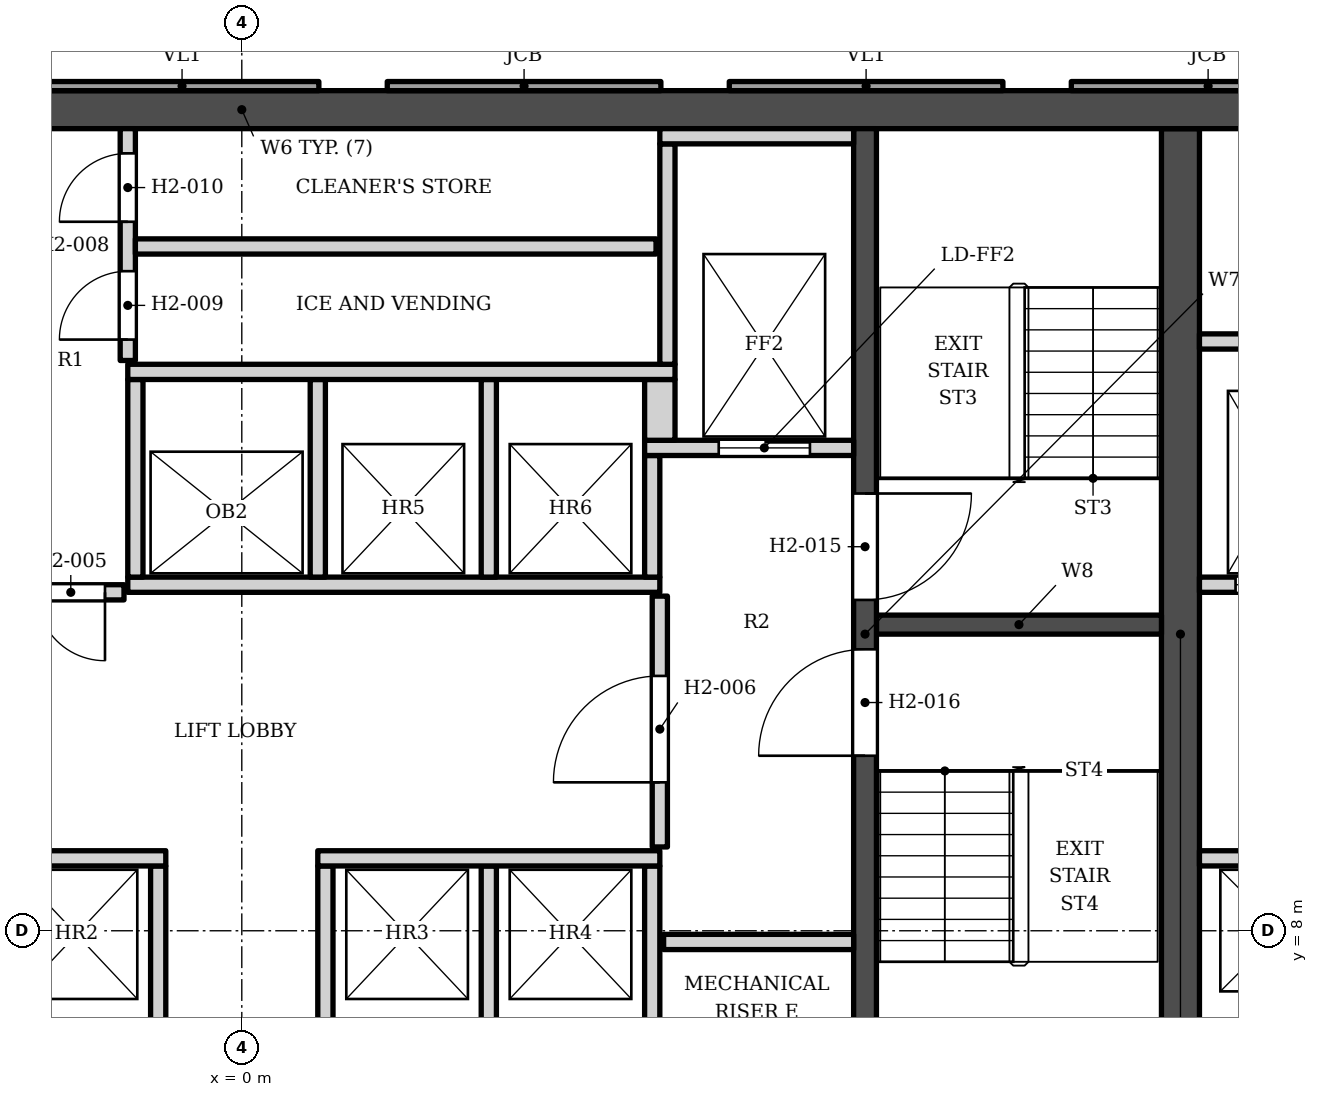
"""IFC4 building model, lengths in metres.
Left out: names, types, materials, properties, quantities, classifications, styles, units other than length and angle.
Written with IfcOpenShell. Run it as: python <this file> out.ifc"""

import sys

from ifc_helpers import new_model, si_unit, direction, frame, frame_2d, origin, place, context, subcontext, project, spatial, polyline, rectangle, outline, extrude, element, fill, save


model = new_model("IFC4")
c1 = context("Model", 3, precision=1e-05, world=origin(), true_north=direction((0.0, 1.0)))
c2 = subcontext(c1, "Body", "Model", "MODEL_VIEW")
j1 = project(units=[si_unit("LENGTHUNIT", "METRE"), si_unit("PLANEANGLEUNIT", "RADIAN")], contexts=[c1])
p1 = place(None, origin())
s1 = spatial("IfcSite", under=j1, at=p1, CompositionType="ELEMENT")
p2 = place(p1, origin())
s2 = spatial("IfcBuilding", under=s1, at=p2, CompositionType="ELEMENT")
p3 = place(p2, frame((0.0, 0.0, 56.2)))
s3 = spatial("IfcBuildingStorey", under=s2, at=p3, CompositionType="ELEMENT", Elevation=56.2)
p4 = place(p3, frame((-16.9, 18.802, 0.0), z_axis=(0.0, 0.0, 1.0), x_axis=(1.0, 0.0, 0.0)))
e1 = element("IfcWall", 1, at=p4, inside=s3, PredefinedType="SHEAR", context=c2, shape_type="SweptSolid", body=[
    extrude(rectangle(XDim=33.8, YDim=0.5, at=frame_2d((16.9, 0.0))), origin(), (0.0, 0.0, 1.0), 3.4),
])
p5 = place(p3, frame((12.35, 5.253, 0.0), z_axis=(0.0, 0.0, 1.0), x_axis=(0.0, 1.0, 0.0)))
e2 = element("IfcWall", 2, at=p5, inside=s3, PredefinedType="SHEAR", context=c2, shape_type="SweptSolid", body=[
    extrude(rectangle(XDim=13.3, YDim=0.5, at=frame_2d((6.65, 0.0))), origin(), (0.0, 0.0, 1.0), 3.4),
])
p6 = place(p3, frame((8.2, 5.253, 0.0), z_axis=(0.0, 0.0, 1.0), x_axis=(0.0, 1.0, 0.0)))
e3 = element("IfcWall", 3, at=p6, inside=s3, PredefinedType="SHEAR", context=c2, shape_type="SweptSolid", body=[
    extrude(rectangle(XDim=13.3, YDim=0.3, at=frame_2d((6.65, 0.0))), origin(), (0.0, 0.0, 1.0), 3.4),
])
p7 = place(p6, frame((7.1, 0.0, 0.0)))
e4 = element("IfcOpeningElement", 4, at=p7, cuts=e3, PredefinedType="OPENING", context=c2, shape_type="SweptSolid", body=[
    extrude(rectangle(XDim=1.4, YDim=2.1, at=frame_2d((0.7, 1.05))), frame((0.0, 0.16, 0.0), z_axis=(0.0, -1.0, 0.0), x_axis=(1.0, 0.0, 0.0)), (0.0, 0.0, 1.0), 0.32),
])
p8 = place(p6, frame((5.05, 0.0, 0.0)))
e5 = element("IfcOpeningElement", 5, at=p8, cuts=e3, PredefinedType="OPENING", context=c2, shape_type="SweptSolid", body=[
    extrude(rectangle(XDim=1.4, YDim=2.1, at=frame_2d((0.7, 1.05))), frame((0.0, 0.16, 0.0), z_axis=(0.0, -1.0, 0.0), x_axis=(1.0, 0.0, 0.0)), (0.0, 0.0, 1.0), 0.32),
])
p9 = place(p3, frame((8.35, 12.028, 0.0), z_axis=(0.0, 0.0, 1.0), x_axis=(1.0, 0.0, 0.0)))
e6 = element("IfcWall", 6, at=p9, inside=s3, PredefinedType="SHEAR", context=c2, shape_type="SweptSolid", body=[
    extrude(rectangle(XDim=3.75, YDim=0.25, at=frame_2d((1.875, 0.0))), origin(), (0.0, 0.0, 1.0), 3.4),
])
p10 = place(p3, origin())
e7 = element("IfcWall", 7, at=p10, inside=s3, PredefinedType="SOLIDWALL", context=c2, shape_type="SweptSolid", body=[
    extrude(outline(polyline([(10.914, 19.173), (10.914, 19.052), (14.514, 19.052), (14.514, 19.173), (10.914, 19.173)])), origin(), (0.0, 0.0, 1.0), 2.65),
])
p11 = place(p3, origin())
e8 = element("IfcWall", 8, at=p11, inside=s3, PredefinedType="ELEMENTEDWALL", context=c2, shape_type="SweptSolid", body=[
    extrude(outline(polyline([(6.414, 19.173), (6.414, 19.052), (10.014, 19.052), (10.014, 19.173), (6.414, 19.173)])), origin(), (0.0, 0.0, 1.0), 2.65),
])
p12 = place(p3, origin())
e9 = element("IfcWall", 9, at=p12, inside=s3, PredefinedType="SOLIDWALL", context=c2, shape_type="SweptSolid", body=[
    extrude(outline(polyline([(1.914, 19.173), (1.914, 19.052), (5.514, 19.052), (5.514, 19.173), (1.914, 19.173)])), origin(), (0.0, 0.0, 1.0), 2.65),
])
p13 = place(p3, origin())
e10 = element("IfcWall", 10, at=p13, inside=s3, PredefinedType="ELEMENTEDWALL", context=c2, shape_type="SweptSolid", body=[
    extrude(outline(polyline([(-2.586, 19.173), (-2.586, 19.052), (1.014, 19.052), (1.014, 19.173), (-2.586, 19.173)])), origin(), (0.0, 0.0, 1.0), 2.65),
])
for number, where, z_axis, x_axis in (
    (11, (-1.1, 6.353, 0.0), (0.0, 0.0, 1.0), (0.0, 1.0, 0.0)),
    (12, (1.1, 6.353, 0.0), (0.0, 0.0, 1.0), (0.0, 1.0, 0.0)),
    (13, (3.25, 6.353, 0.0), (0.0, 0.0, 1.0), (0.0, 1.0, 0.0)),
    (14, (5.4, 6.353, 0.0), (0.0, 0.0, 1.0), (0.0, 1.0, 0.0)),
    (15, (5.55, 7.853, 0.0), (0.0, 0.0, 1.0), (1.0, 0.0, 0.0)),
):
    element("IfcWall", number, at=place(p3, frame(where, z_axis=z_axis, x_axis=x_axis)), inside=s3, PredefinedType="SOLIDWALL", context=c2, shape_type="SweptSolid", body=[
        extrude(rectangle(XDim=2.5, YDim=0.2, at=frame_2d((1.25, 0.0))), origin(), (0.0, 0.0, 1.0), 3.23),
    ])
for number, where, z_axis, x_axis in (
    (16, (-5.5, 8.953, 0.0), (0.0, 0.0, 1.0), (1.0, 0.0, 0.0)),
    (17, (1.0, 8.953, 0.0), (0.0, 0.0, 1.0), (1.0, 0.0, 0.0)),
):
    element("IfcWall", number, at=place(p3, frame(where, z_axis=z_axis, x_axis=x_axis)), inside=s3, PredefinedType="SOLIDWALL", context=c2, shape_type="SweptSolid", body=[
        extrude(rectangle(XDim=4.5, YDim=0.2, at=frame_2d((2.25, 0.0))), origin(), (0.0, 0.0, 1.0), 3.23),
    ])
p14 = place(p3, frame((12.6, 8.953, 0.0), z_axis=(0.0, 0.0, 1.0), x_axis=(1.0, 0.0, 0.0)))
e18 = element("IfcWall", 18, at=p14, inside=s3, PredefinedType="SOLIDWALL", context=c2, shape_type="SweptSolid", body=[
    extrude(rectangle(XDim=4.3, YDim=0.2, at=frame_2d((2.15, 0.0))), origin(), (0.0, 0.0, 1.0), 3.23),
])
p15 = place(p14, frame((0.525, 0.0, 0.0)))
e19 = element("IfcOpeningElement", 19, at=p15, cuts=e18, PredefinedType="OPENING", context=c2, shape_type="SweptSolid", body=[
    extrude(rectangle(XDim=1.1, YDim=2.1, at=frame_2d((0.55, 1.05))), frame((0.0, 0.11, 0.0), z_axis=(0.0, -1.0, 0.0), x_axis=(1.0, 0.0, 0.0)), (0.0, 0.0, 1.0), 0.22),
])
p16 = place(p14, frame((2.775, 0.0, 0.0)))
e20 = element("IfcOpeningElement", 20, at=p16, cuts=e18, PredefinedType="OPENING", context=c2, shape_type="SweptSolid", body=[
    extrude(rectangle(XDim=1.1, YDim=2.1, at=frame_2d((0.55, 1.05))), frame((0.0, 0.11, 0.0), z_axis=(0.0, -1.0, 0.0), x_axis=(1.0, 0.0, 0.0)), (0.0, 0.0, 1.0), 0.22),
])
p17 = place(p3, frame((5.5, 9.103, 0.0), z_axis=(0.0, 0.0, 1.0), x_axis=(0.0, 1.0, 0.0)))
e21 = element("IfcWall", 21, at=p17, inside=s3, PredefinedType="SOLIDWALL", context=c2, shape_type="SweptSolid", body=[
    extrude(rectangle(XDim=3.3, YDim=0.2, at=frame_2d((1.65, 0.0))), origin(), (0.0, 0.0, 1.0), 3.23),
])
p18 = place(p17, frame((0.85, 0.0, 0.0)))
e22 = element("IfcOpeningElement", 22, at=p18, cuts=e21, PredefinedType="OPENING", context=c2, shape_type="SweptSolid", body=[
    extrude(rectangle(XDim=1.4, YDim=2.1, at=frame_2d((0.7, 1.05))), frame((0.0, 0.11, 0.0), z_axis=(0.0, -1.0, 0.0), x_axis=(1.0, 0.0, 0.0)), (0.0, 0.0, 1.0), 0.22),
])
p19 = place(p3, frame((-2.95, 12.453, 0.0), z_axis=(0.0, 0.0, 1.0), x_axis=(1.0, 0.0, 0.0)))
e23 = element("IfcWall", 23, at=p19, inside=s3, PredefinedType="SOLIDWALL", context=c2, shape_type="SweptSolid", body=[
    extrude(rectangle(XDim=1.4, YDim=0.2, at=frame_2d((0.7, 0.0))), origin(), (0.0, 0.0, 1.0), 3.23),
])
p20 = place(p19, frame((0.25, 0.0, 0.0)))
e24 = element("IfcOpeningElement", 24, at=p20, cuts=e23, PredefinedType="OPENING", context=c2, shape_type="SweptSolid", body=[
    extrude(rectangle(XDim=0.9, YDim=2.1, at=frame_2d((0.45, 1.05))), frame((0.0, 0.11, 0.0), z_axis=(0.0, -1.0, 0.0), x_axis=(1.0, 0.0, 0.0)), (0.0, 0.0, 1.0), 0.22),
])
p21 = place(p3, frame((-1.5, 12.552, 0.0), z_axis=(0.0, 0.0, 1.0), x_axis=(1.0, 0.0, 0.0)))
e25 = element("IfcWall", 25, at=p21, inside=s3, PredefinedType="SOLIDWALL", context=c2, shape_type="SweptSolid", body=[
    extrude(rectangle(XDim=7.0, YDim=0.2, at=frame_2d((3.5, 0.0))), origin(), (0.0, 0.0, 1.0), 3.23),
])
p22 = place(p3, frame((12.6, 12.552, 0.0), z_axis=(0.0, 0.0, 1.0), x_axis=(1.0, 0.0, 0.0)))
e26 = element("IfcWall", 26, at=p22, inside=s3, PredefinedType="SOLIDWALL", context=c2, shape_type="SweptSolid", body=[
    extrude(rectangle(XDim=4.3, YDim=0.2, at=frame_2d((2.15, 0.0))), origin(), (0.0, 0.0, 1.0), 3.23),
])
p23 = place(p22, frame((0.475, 0.0, 0.0)))
e27 = element("IfcOpeningElement", 27, at=p23, cuts=e26, PredefinedType="OPENING", context=c2, shape_type="SweptSolid", body=[
    extrude(rectangle(XDim=1.2, YDim=2.1, at=frame_2d((0.6, 1.05))), frame((0.0, 0.11, 0.0), z_axis=(0.0, -1.0, 0.0), x_axis=(1.0, 0.0, 0.0)), (0.0, 0.0, 1.0), 0.22),
])
p24 = place(p22, frame((2.625, 0.0, 0.0)))
e28 = element("IfcOpeningElement", 28, at=p24, cuts=e26, PredefinedType="OPENING", context=c2, shape_type="SweptSolid", body=[
    extrude(rectangle(XDim=1.4, YDim=2.1, at=frame_2d((0.7, 1.05))), frame((0.0, 0.11, 0.0), z_axis=(0.0, -1.0, 0.0), x_axis=(1.0, 0.0, 0.0)), (0.0, 0.0, 1.0), 0.22),
])
for number, where, z_axis, x_axis in (
    (29, (-1.4, 12.653, 0.0), (0.0, 0.0, 1.0), (0.0, 1.0, 0.0)),
    (30, (1.0, 12.653, 0.0), (0.0, 0.0, 1.0), (0.0, 1.0, 0.0)),
    (31, (3.25, 12.653, 0.0), (0.0, 0.0, 1.0), (0.0, 1.0, 0.0)),
):
    element("IfcWall", number, at=place(p3, frame(where, z_axis=z_axis, x_axis=x_axis)), inside=s3, PredefinedType="SOLIDWALL", context=c2, shape_type="SweptSolid", body=[
        extrude(rectangle(XDim=2.6, YDim=0.2, at=frame_2d((1.3, 0.0))), origin(), (0.0, 0.0, 1.0), 3.23),
    ])
p25 = place(p3, frame((5.4, 12.653, 0.0), z_axis=(0.0, 0.0, 1.0), x_axis=(0.0, 1.0, 0.0)))
e32 = element("IfcWall", 32, at=p25, inside=s3, PredefinedType="SOLIDWALL", context=c2, shape_type="SweptSolid", body=[
    extrude(rectangle(XDim=1.6, YDim=0.2, at=frame_2d((0.8, 0.0))), origin(), (0.0, 0.0, 1.0), 3.23),
])
p26 = place(p3, frame((5.3, 14.353, 0.0), z_axis=(0.0, 0.0, 1.0), x_axis=(1.0, 0.0, 0.0)))
e33 = element("IfcWall", 33, at=p26, inside=s3, PredefinedType="SOLIDWALL", context=c2, shape_type="SweptSolid", body=[
    extrude(rectangle(XDim=2.75, YDim=0.2, at=frame_2d((1.375, 0.0))), origin(), (0.0, 0.0, 1.0), 3.23),
])
p27 = place(p26, frame((0.975, 0.0, 0.0)))
e34 = element("IfcOpeningElement", 34, at=p27, cuts=e33, PredefinedType="OPENING", context=c2, shape_type="SweptSolid", body=[
    extrude(rectangle(XDim=1.2, YDim=2.1, at=frame_2d((0.6, 1.05))), frame((0.0, 0.11, 0.0), z_axis=(0.0, -1.0, 0.0), x_axis=(1.0, 0.0, 0.0)), (0.0, 0.0, 1.0), 0.22),
])
p28 = place(p3, frame((5.5, 14.453, 0.0), z_axis=(0.0, 0.0, 1.0), x_axis=(0.0, 1.0, 0.0)))
e35 = element("IfcWall", 35, at=p28, inside=s3, PredefinedType="SOLIDWALL", context=c2, shape_type="SweptSolid", body=[
    extrude(rectangle(XDim=0.8, YDim=0.4, at=frame_2d((0.4, 0.0))), origin(), (0.0, 0.0, 1.0), 3.23),
])
p29 = place(p3, frame((-1.5, 15.353, 0.0), z_axis=(0.0, 0.0, 1.0), x_axis=(1.0, 0.0, 0.0)))
e36 = element("IfcWall", 36, at=p29, inside=s3, PredefinedType="SOLIDWALL", context=c2, shape_type="SweptSolid", body=[
    extrude(rectangle(XDim=7.2, YDim=0.2, at=frame_2d((3.6, 0.0))), origin(), (0.0, 0.0, 1.0), 3.23),
])
p30 = place(p3, frame((5.6, 15.453, 0.0), z_axis=(0.0, 0.0, 1.0), x_axis=(0.0, 1.0, 0.0)))
e37 = element("IfcWall", 37, at=p30, inside=s3, PredefinedType="SOLIDWALL", context=c2, shape_type="SweptSolid", body=[
    extrude(rectangle(XDim=2.9, YDim=0.2, at=frame_2d((1.45, 0.0))), origin(), (0.0, 0.0, 1.0), 3.23),
])
p31 = place(p3, frame((-1.5, 15.503, 0.0), z_axis=(0.0, 0.0, 1.0), x_axis=(0.0, 1.0, 0.0)))
e38 = element("IfcWall", 38, at=p31, inside=s3, PredefinedType="SOLIDWALL", context=c2, shape_type="SweptSolid", body=[
    extrude(rectangle(XDim=3.05, YDim=0.2, at=frame_2d((1.525, 0.0))), origin(), (0.0, 0.0, 1.0), 3.23),
])
p32 = place(p31, frame((0.275, 0.0, 0.0)))
e39 = element("IfcOpeningElement", 39, at=p32, cuts=e38, PredefinedType="OPENING", context=c2, shape_type="SweptSolid", body=[
    extrude(rectangle(XDim=0.9, YDim=2.1, at=frame_2d((0.45, 1.05))), frame((0.0, 0.11, 0.0), z_axis=(0.0, -1.0, 0.0), x_axis=(1.0, 0.0, 0.0)), (0.0, 0.0, 1.0), 0.22),
])
p33 = place(p31, frame((1.825, 0.0, 0.0)))
e40 = element("IfcOpeningElement", 40, at=p33, cuts=e38, PredefinedType="OPENING", context=c2, shape_type="SweptSolid", body=[
    extrude(rectangle(XDim=0.9, YDim=2.1, at=frame_2d((0.45, 1.05))), frame((0.0, 0.11, 0.0), z_axis=(0.0, -1.0, 0.0), x_axis=(1.0, 0.0, 0.0)), (0.0, 0.0, 1.0), 0.22),
])
p34 = place(p3, frame((12.6, 15.753, 0.0), z_axis=(0.0, 0.0, 1.0), x_axis=(1.0, 0.0, 0.0)))
e41 = element("IfcWall", 41, at=p34, inside=s3, PredefinedType="SOLIDWALL", context=c2, shape_type="SweptSolid", body=[
    extrude(rectangle(XDim=4.3, YDim=0.2, at=frame_2d((2.15, 0.0))), origin(), (0.0, 0.0, 1.0), 3.23),
])
p35 = place(p3, frame((-1.4, 17.003, 0.0), z_axis=(0.0, 0.0, 1.0), x_axis=(1.0, 0.0, 0.0)))
e42 = element("IfcWall", 42, at=p35, inside=s3, PredefinedType="SOLIDWALL", context=c2, shape_type="SweptSolid", body=[
    extrude(rectangle(XDim=6.85, YDim=0.2, at=frame_2d((3.425, 0.0))), origin(), (0.0, 0.0, 1.0), 3.23),
])
p36 = place(p3, frame((5.5, 18.453, 0.0), z_axis=(0.0, 0.0, 1.0), x_axis=(1.0, 0.0, 0.0)))
e43 = element("IfcWall", 43, at=p36, inside=s3, PredefinedType="SOLIDWALL", context=c2, shape_type="SweptSolid", body=[
    extrude(rectangle(XDim=2.55, YDim=0.2, at=frame_2d((1.275, 0.0))), origin(), (0.0, 0.0, 1.0), 3.23),
])
p37 = place(p27, origin())
e44 = element("IfcDoor", 44, at=p37, inside=s3, OperationType="DOUBLE_DOOR_SLIDING", PredefinedType="DOOR", context=c2, shape_type="SweptSolid", body=[
    extrude(rectangle(XDim=1.2, YDim=2.1, at=frame_2d((0.6, 1.05))), frame((0.0, 0.025, 0.0), z_axis=(0.0, -1.0, 0.0), x_axis=(1.0, 0.0, 0.0)), (0.0, 0.0, 1.0), 0.05),
])
fill(e34, e44)
p38 = place(p23, origin())
e45 = element("IfcDoor", 45, at=p38, inside=s3, OperationType="DOUBLE_DOOR_SLIDING", PredefinedType="DOOR", context=c2, shape_type="SweptSolid", body=[
    extrude(rectangle(XDim=1.2, YDim=2.1, at=frame_2d((0.6, 1.05))), frame((0.0, 0.025, 0.0), z_axis=(0.0, -1.0, 0.0), x_axis=(1.0, 0.0, 0.0)), (0.0, 0.0, 1.0), 0.05),
])
fill(e27, e45)
p39 = place(p7, origin())
e46 = element("IfcDoor", 46, at=p39, inside=s3, OperationType="SINGLE_SWING_RIGHT", PredefinedType="DOOR", context=c2, shape_type="SweptSolid", body=[
    extrude(rectangle(XDim=1.4, YDim=2.1, at=frame_2d((0.7, 1.05))), frame((0.0, 0.025, 0.0), z_axis=(0.0, -1.0, 0.0), x_axis=(1.0, 0.0, 0.0)), (0.0, 0.0, 1.0), 0.05),
])
fill(e4, e46)
p40 = place(p8, origin())
e47 = element("IfcDoor", 47, at=p40, inside=s3, OperationType="SINGLE_SWING_LEFT", PredefinedType="DOOR", context=c2, shape_type="SweptSolid", body=[
    extrude(rectangle(XDim=1.4, YDim=2.1, at=frame_2d((0.7, 1.05))), frame((0.0, 0.025, 0.0), z_axis=(0.0, -1.0, 0.0), x_axis=(1.0, 0.0, 0.0)), (0.0, 0.0, 1.0), 0.05),
])
fill(e5, e47)
p41 = place(p20, origin())
e48 = element("IfcDoor", 48, at=p41, inside=s3, OperationType="SINGLE_SWING_RIGHT", PredefinedType="DOOR", context=c2, shape_type="SweptSolid", body=[
    extrude(rectangle(XDim=0.9, YDim=2.1, at=frame_2d((0.45, 1.05))), frame((0.0, 0.025, 0.0), z_axis=(0.0, -1.0, 0.0), x_axis=(1.0, 0.0, 0.0)), (0.0, 0.0, 1.0), 0.05),
])
fill(e24, e48)
p42 = place(p18, origin())
e49 = element("IfcDoor", 49, at=p42, inside=s3, OperationType="SINGLE_SWING_LEFT", PredefinedType="DOOR", context=c2, shape_type="SweptSolid", body=[
    extrude(rectangle(XDim=1.4, YDim=2.1, at=frame_2d((0.7, 1.05))), frame((0.0, 0.025, 0.0), z_axis=(0.0, -1.0, 0.0), x_axis=(1.0, 0.0, 0.0)), (0.0, 0.0, 1.0), 0.05),
])
fill(e22, e49)
p43 = place(p32, origin())
e50 = element("IfcDoor", 50, at=p43, inside=s3, OperationType="SINGLE_SWING_LEFT", PredefinedType="DOOR", context=c2, shape_type="SweptSolid", body=[
    extrude(rectangle(XDim=0.9, YDim=2.1, at=frame_2d((0.45, 1.05))), frame((0.0, 0.025, 0.0), z_axis=(0.0, -1.0, 0.0), x_axis=(1.0, 0.0, 0.0)), (0.0, 0.0, 1.0), 0.05),
])
fill(e39, e50)
p44 = place(p33, origin())
e51 = element("IfcDoor", 51, at=p44, inside=s3, OperationType="SINGLE_SWING_LEFT", PredefinedType="DOOR", context=c2, shape_type="SweptSolid", body=[
    extrude(rectangle(XDim=0.9, YDim=2.1, at=frame_2d((0.45, 1.05))), frame((0.0, 0.025, 0.0), z_axis=(0.0, -1.0, 0.0), x_axis=(1.0, 0.0, 0.0)), (0.0, 0.0, 1.0), 0.05),
])
fill(e40, e51)
save(model, sys.argv[1])
